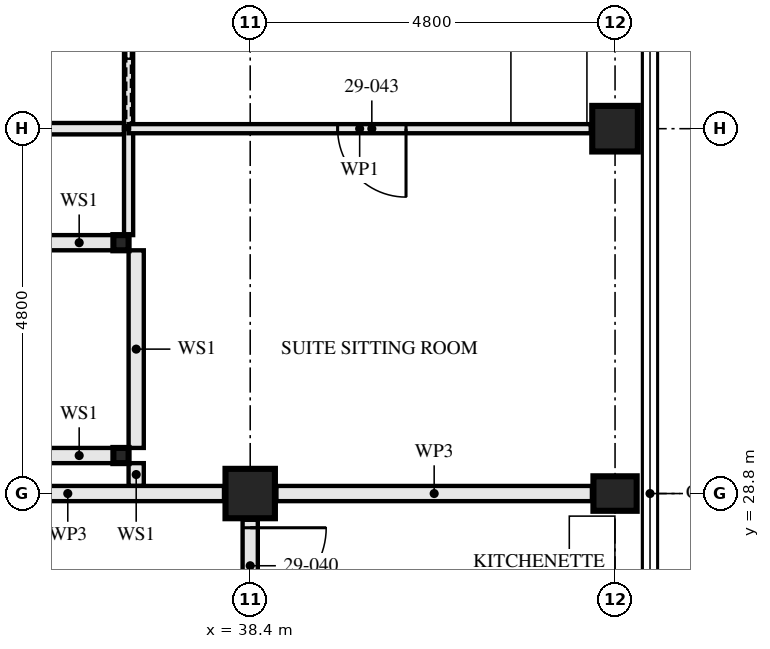
"""IFC4 building model, lengths in metres.
Left out: names, types, materials, properties, quantities, classifications, styles, units other than length and angle.
Written with IfcOpenShell. Run it as: python <this file> out.ifc"""

import sys

from ifc_helpers import new_model, si_unit, direction, frame, frame_2d, origin, origin_2d, place, context, subcontext, project, spatial, rectangle, hollow_rectangle, i_section, extrude, element, fill, save


model = new_model("IFC4")
c1 = context("Model", 3, precision=1e-05, world=origin(), true_north=direction((0.0, 1.0)))
c2 = subcontext(c1, "Body", "Model", "MODEL_VIEW")
j1 = project(units=[si_unit("LENGTHUNIT", "METRE"), si_unit("PLANEANGLEUNIT", "RADIAN")], contexts=[c1])
p1 = place(None, origin())
s1 = spatial("IfcSite", under=j1, at=p1, CompositionType="ELEMENT")
p2 = place(p1, origin())
s2 = spatial("IfcBuilding", under=s1, at=p2, CompositionType="ELEMENT")
p3 = place(p2, frame((0.0, 0.0, 108.5)))
s3 = spatial("IfcBuildingStorey", under=s2, at=p3, CompositionType="ELEMENT", Elevation=108.5)
p4 = place(p3, frame((38.4, 28.8, 0.0), z_axis=(0.0, 0.0, 1.0), x_axis=(0.0, 1.0, 0.0)))
e1 = element("IfcColumn", 1, at=p4, inside=s3, PredefinedType="COLUMN", context=c2, shape_type="SweptSolid", body=[
    extrude(hollow_rectangle(XDim=0.65, YDim=0.65, WallThickness=0.05, at=origin_2d()), origin(), (0.0, 0.0, 1.0), 3.5),
])
p5 = place(p3, frame((43.2, 28.8, 0.0), z_axis=(0.0, 0.0, 1.0), x_axis=(0.0, 1.0, 0.0)))
e2 = element("IfcColumn", 2, at=p5, inside=s3, PredefinedType="COLUMN", context=c2, shape_type="SweptSolid", body=[
    extrude(i_section(OverallWidth=0.454, OverallDepth=0.569, WebThickness=0.078, FlangeThickness=0.125, FilletRadius=0.015, at=origin_2d()), origin(), (0.0, 0.0, 1.0), 3.5),
])
p6 = place(p3, frame((43.2, 33.6, 0.0), z_axis=(0.0, 0.0, 1.0), x_axis=(1.0, 0.0, 0.0)))
e3 = element("IfcColumn", 3, at=p6, inside=s3, PredefinedType="COLUMN", context=c2, shape_type="SweptSolid", body=[
    extrude(hollow_rectangle(XDim=0.6, YDim=0.6, WallThickness=0.08, at=origin_2d()), origin(), (0.0, 0.0, 1.0), 3.5),
])
for number, where, z_axis, x_axis in (
    (4, (36.7, 29.3, 0.0), (0.0, 0.0, 1.0), (1.0, 0.0, 0.0)),
    (5, (36.7, 32.1, 0.0), (0.0, 0.0, 1.0), (1.0, 0.0, 0.0)),
):
    element("IfcColumn", number, at=place(p3, frame(where, z_axis=z_axis, x_axis=x_axis)), inside=s3, PredefinedType="COLUMN", context=c2, shape_type="SweptSolid", body=[
        extrude(hollow_rectangle(XDim=0.2, YDim=0.2, WallThickness=0.008, at=origin_2d()), origin(), (0.0, 0.0, 1.0), 3.33),
    ])
p7 = place(p3, frame((38.4, 26.8, 0.0), z_axis=(0.0, 0.0, 1.0), x_axis=(0.0, 1.0, 0.0)))
e6 = element("IfcWall", 6, at=p7, inside=s3, PredefinedType="PARTITIONING", context=c2, shape_type="SweptSolid", body=[
    extrude(rectangle(XDim=1.655, YDim=0.2, at=frame_2d((0.828, 0.0))), origin(), (0.0, 0.0, 1.0), 3.33),
])
p8 = place(p7, frame((0.55, 0.0, 0.0)))
e7 = element("IfcOpeningElement", 7, at=p8, cuts=e6, PredefinedType="OPENING", context=c2, shape_type="SweptSolid", body=[
    extrude(rectangle(XDim=1.0, YDim=2.1, at=frame_2d((0.5, 1.05))), frame((0.0, 0.111, 0.0), z_axis=(0.0, -1.0, 0.0), x_axis=(1.0, 0.0, 0.0)), (0.0, 0.0, 1.0), 0.221),
])
for number, where, z_axis, x_axis in (
    (8, (36.6, 29.3, 0.0), (0.0, 0.0, 1.0), (-1.0, 0.0, 0.0)),
    (9, (36.6, 32.1, 0.0), (0.0, 0.0, 1.0), (-1.0, 0.0, 0.0)),
):
    element("IfcWall", number, at=place(p3, frame(where, z_axis=z_axis, x_axis=x_axis)), inside=s3, PredefinedType="SOLIDWALL", context=c2, shape_type="SweptSolid", body=[
        extrude(rectangle(XDim=0.9, YDim=0.2, at=frame_2d((0.45, 0.0))), origin(), (0.0, 0.0, 1.0), 2.99),
    ])
p9 = place(p3, frame((36.9, 28.9, 0.0), z_axis=(0.0, 0.0, 1.0), x_axis=(0.0, 1.0, 0.0)))
e10 = element("IfcWall", 10, at=p9, inside=s3, PredefinedType="SOLIDWALL", context=c2, shape_type="SweptSolid", body=[
    extrude(rectangle(XDim=0.3, YDim=0.2, at=frame_2d((0.15, 0.0))), origin(), (0.0, 0.0, 1.0), 3.33),
])
p10 = place(p3, frame((36.9, 29.4, 0.0), z_axis=(0.0, 0.0, 1.0), x_axis=(0.0, 1.0, 0.0)))
e11 = element("IfcWall", 11, at=p10, inside=s3, PredefinedType="SOLIDWALL", context=c2, shape_type="SweptSolid", body=[
    extrude(rectangle(XDim=2.6, YDim=0.2, at=frame_2d((1.3, 0.0))), origin(), (0.0, 0.0, 1.0), 3.33),
])
p11 = place(p3, frame((36.8, 32.2, 0.0), z_axis=(0.0, 0.0, 1.0), x_axis=(0.0, 1.0, 0.0)))
e12 = element("IfcWall", 12, at=p11, inside=s3, PredefinedType="PARTITIONING", context=c2, shape_type="SweptSolid", body=[
    extrude(rectangle(XDim=1.4, YDim=0.12, at=frame_2d((0.7, 0.0))), origin(), (0.0, 0.0, 1.0), 3.33),
])
p12 = place(p3, frame((36.8, 33.6, 0.0), z_axis=(0.0, 0.0, 1.0), x_axis=(0.0, 1.0, 0.0)))
e13 = element("IfcWall", 13, at=p12, inside=s3, PredefinedType="PARTITIONING", context=c2, shape_type="SweptSolid", body=[
    extrude(rectangle(XDim=4.8, YDim=0.12, at=frame_2d((2.4, 0.0))), origin(), (0.0, 0.0, 1.0), 3.33),
])
p13 = place(p12, frame((3.45, 0.0, 0.0)))
e14 = element("IfcOpeningElement", 14, at=p13, cuts=e13, PredefinedType="OPENING", context=c2, shape_type="SweptSolid", body=[
    extrude(rectangle(XDim=0.9, YDim=2.1, at=frame_2d((0.45, 1.05))), frame((0.0, 0.071, 0.0), z_axis=(0.0, -1.0, 0.0), x_axis=(1.0, 0.0, 0.0)), (0.0, 0.0, 1.0), 0.141),
])
p14 = place(p12, frame((0.925, 0.0, 0.0)))
e15 = element("IfcOpeningElement", 15, at=p14, cuts=e13, PredefinedType="OPENING", context=c2, shape_type="SweptSolid", body=[
    extrude(rectangle(XDim=0.95, YDim=2.1, at=frame_2d((0.475, 1.05))), frame((0.0, 0.071, 0.0), z_axis=(0.0, -1.0, 0.0), x_axis=(1.0, 0.0, 0.0)), (0.0, 0.0, 1.0), 0.141),
])
p15 = place(p3, frame((42.88, 33.6, 0.0), z_axis=(0.0, 0.0, 1.0), x_axis=(-1.0, 0.0, 0.0)))
e16 = element("IfcWall", 16, at=p15, inside=s3, PredefinedType="PARTITIONING", context=c2, shape_type="SweptSolid", body=[
    extrude(rectangle(XDim=6.08, YDim=0.12, at=frame_2d((3.04, 0.0))), origin(), (0.0, 0.0, 1.0), 2.55),
])
p16 = place(p15, frame((2.43, 0.0, 0.0)))
e17 = element("IfcOpeningElement", 17, at=p16, cuts=e16, PredefinedType="OPENING", context=c2, shape_type="SweptSolid", body=[
    extrude(rectangle(XDim=0.9, YDim=2.1, at=frame_2d((0.45, 1.05))), frame((0.0, 0.071, 0.0), z_axis=(0.0, -1.0, 0.0), x_axis=(1.0, 0.0, 0.0)), (0.0, 0.0, 1.0), 0.141),
])
p17 = place(p3, frame((42.896, 28.8, 0.0), z_axis=(0.0, 0.0, 1.0), x_axis=(-1.0, 0.0, 0.0)))
e18 = element("IfcWall", 18, at=p17, inside=s3, PredefinedType="PARTITIONING", context=c2, shape_type="SweptSolid", body=[
    extrude(rectangle(XDim=4.15, YDim=0.2, at=frame_2d((2.075, 0.0))), origin(), (0.0, 0.0, 1.0), 2.32),
])
p18 = place(p3, frame((38.055, 28.8, 0.0), z_axis=(0.0, 0.0, 1.0), x_axis=(-1.0, 0.0, 0.0)))
e19 = element("IfcWall", 19, at=p18, inside=s3, PredefinedType="PARTITIONING", context=c2, shape_type="SweptSolid", body=[
    extrude(rectangle(XDim=4.11, YDim=0.2, at=frame_2d((2.055, 0.0))), origin(), (0.0, 0.0, 1.0), 2.32),
])
p19 = place(p3, frame((36.74, 33.6, 0.0), z_axis=(0.0, 0.0, 1.0), x_axis=(-1.0, 0.0, 0.0)))
e20 = element("IfcWall", 20, at=p19, inside=s3, PredefinedType="PARTITIONING", context=c2, shape_type="SweptSolid", body=[
    extrude(rectangle(XDim=2.865, YDim=0.15, at=frame_2d((1.433, 0.0))), origin(), (0.0, 0.0, 1.0), 2.55),
])
p20 = place(p8, frame((1.0, 0.0, 0.0), z_axis=(0.0, 0.0, 1.0), x_axis=(-1.0, 0.0, 0.0)))
e21 = element("IfcDoor", 21, at=p20, inside=s3, OperationType="SINGLE_SWING_RIGHT", PredefinedType="DOOR", context=c2, shape_type="SweptSolid", body=[
    extrude(rectangle(XDim=1.0, YDim=2.1, at=frame_2d((0.5, 1.05))), frame((0.0, 0.027, 0.0), z_axis=(0.0, -1.0, 0.0), x_axis=(1.0, 0.0, 0.0)), (0.0, 0.0, 1.0), 0.054),
])
fill(e7, e21)
p21 = place(p14, origin())
e22 = element("IfcDoor", 22, at=p21, inside=s3, OperationType="SLIDING_TO_RIGHT", PredefinedType="DOOR", context=c2, shape_type="SweptSolid", body=[
    extrude(rectangle(XDim=0.95, YDim=2.1, at=frame_2d((0.475, 1.05))), frame((0.0, 0.022, 0.0), z_axis=(0.0, -1.0, 0.0), x_axis=(1.0, 0.0, 0.0)), (0.0, 0.0, 1.0), 0.044),
])
fill(e15, e22)
p22 = place(p16, origin())
e23 = element("IfcDoor", 23, at=p22, inside=s3, OperationType="SINGLE_SWING_RIGHT", PredefinedType="DOOR", context=c2, shape_type="SweptSolid", body=[
    extrude(rectangle(XDim=0.9, YDim=2.1, at=frame_2d((0.45, 1.05))), frame((0.0, 0.022, 0.0), z_axis=(0.0, -1.0, 0.0), x_axis=(1.0, 0.0, 0.0)), (0.0, 0.0, 1.0), 0.044),
])
fill(e17, e23)
save(model, sys.argv[1])
